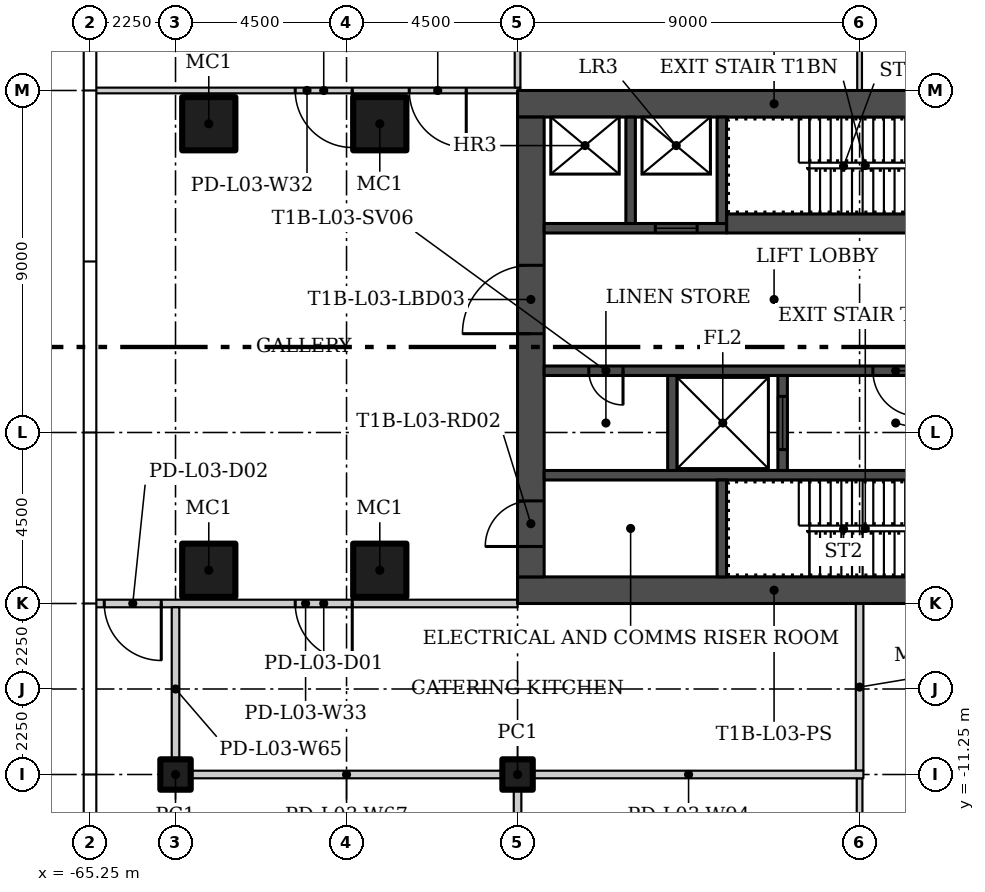
"""IFC4 building model, lengths in metres.
Left out: names, types, materials, properties, quantities, classifications, styles, units other than length and angle.
Written with IfcOpenShell. Run it as: python <this file> out.ifc"""

import sys

from ifc_helpers import new_model, si_unit, direction, frame, frame_2d, origin, origin_2d, place, context, subcontext, project, spatial, rectangle, hollow_rectangle, extrude, element, fill, save


model = new_model("IFC4")
c1 = context("Model", 3, precision=1e-05, world=origin(), true_north=direction((0.0, 1.0)))
c2 = subcontext(c1, "Body", "Model", "MODEL_VIEW")
j1 = project(units=[si_unit("LENGTHUNIT", "METRE"), si_unit("PLANEANGLEUNIT", "RADIAN")], contexts=[c1])
p1 = place(None, origin())
s1 = spatial("IfcSite", under=j1, at=p1, CompositionType="ELEMENT")
p2 = place(p1, origin())
s2 = spatial("IfcBuilding", under=s1, at=p2, CompositionType="ELEMENT")
p3 = place(p2, frame((0.0, 0.0, 18.5)))
s3 = spatial("IfcBuildingStorey", under=s2, at=p3, CompositionType="ELEMENT", Elevation=18.5)
for number, where in (
    (1, (-57.625, -5.875, 0.0)),
    (2, (-62.125, -5.875, 0.0)),
    (3, (-57.625, 5.875, 0.0)),
    (4, (-62.125, 5.875, 0.0)),
):
    element("IfcColumn", number, at=place(p3, frame(where)), inside=s3, PredefinedType="COLUMN", context=c2, shape_type="SweptSolid", body=[
        extrude(hollow_rectangle(XDim=1.4, YDim=1.4, WallThickness=0.06, at=origin_2d()), origin(), (0.0, 0.0, 1.0), 4.6),
    ])
for number, where in (
    (5, (-63.0, -11.25, 0.0)),
    (6, (-54.0, -11.25, 0.0)),
):
    element("IfcColumn", number, at=place(p3, frame(where)), inside=s3, PredefinedType="COLUMN", context=c2, shape_type="SweptSolid", body=[
        extrude(hollow_rectangle(XDim=0.8, YDim=0.8, WallThickness=0.03, at=origin_2d()), origin(), (0.0, 0.0, 1.0), 4.6),
    ])
p4 = place(p3, frame((-53.925, 6.75, 0.0), z_axis=(0.0, 0.0, 1.0), x_axis=(-1.0, 0.0, 0.0)))
e7 = element("IfcWall", 7, at=p4, inside=s3, PredefinedType="PARTITIONING", context=c2, shape_type="SweptSolid", body=[
    extrude(rectangle(XDim=11.23, YDim=0.15, at=frame_2d((5.615, 0.0))), origin(), (0.0, 0.0, 1.0), 4.6),
])
p5 = place(p4, frame((1.425, 0.0, 0.0)))
e8 = element("IfcOpeningElement", 8, at=p5, cuts=e7, PredefinedType="OPENING", context=c2, shape_type="SweptSolid", body=[
    extrude(rectangle(XDim=1.5, YDim=2.4, at=frame_2d((0.75, 1.2))), frame((0.0, 0.085, 0.0), z_axis=(0.0, -1.0, 0.0), x_axis=(1.0, 0.0, 0.0)), (0.0, 0.0, 1.0), 0.17),
])
p6 = place(p4, frame((4.425, 0.0, 0.0)))
e9 = element("IfcOpeningElement", 9, at=p6, cuts=e7, PredefinedType="OPENING", context=c2, shape_type="SweptSolid", body=[
    extrude(rectangle(XDim=1.5, YDim=2.4, at=frame_2d((0.75, 1.2))), frame((0.0, 0.085, 0.0), z_axis=(0.0, -1.0, 0.0), x_axis=(1.0, 0.0, 0.0)), (0.0, 0.0, 1.0), 0.17),
])
p7 = place(p3, frame((-54.0, -6.75, 0.0), z_axis=(0.0, 0.0, 1.0), x_axis=(-1.0, 0.0, 0.0)))
e10 = element("IfcWall", 10, at=p7, inside=s3, PredefinedType="PARTITIONING", context=c2, shape_type="SweptSolid", body=[
    extrude(rectangle(XDim=11.155, YDim=0.2, at=frame_2d((5.578, 0.0))), origin(), (0.0, 0.0, 1.0), 4.6),
])
p8 = place(p7, frame((4.35, 0.0, 0.0)))
e11 = element("IfcOpeningElement", 11, at=p8, cuts=e10, PredefinedType="OPENING", context=c2, shape_type="SweptSolid", body=[
    extrude(rectangle(XDim=1.5, YDim=2.4, at=frame_2d((0.75, 1.2))), frame((0.0, 0.11, 0.0), z_axis=(0.0, -1.0, 0.0), x_axis=(1.0, 0.0, 0.0)), (0.0, 0.0, 1.0), 0.22),
])
p9 = place(p7, frame((9.375, 0.0, 0.0)))
e12 = element("IfcOpeningElement", 12, at=p9, cuts=e10, PredefinedType="OPENING", context=c2, shape_type="SweptSolid", body=[
    extrude(rectangle(XDim=1.5, YDim=2.4, at=frame_2d((0.75, 1.2))), frame((0.0, 0.11, 0.0), z_axis=(0.0, -1.0, 0.0), x_axis=(1.0, 0.0, 0.0)), (0.0, 0.0, 1.0), 0.22),
])
p10 = place(p3, frame((-45.0, -17.275, 0.0), z_axis=(0.0, 0.0, 1.0), x_axis=(0.0, 1.0, 0.0)))
e13 = element("IfcWall", 13, at=p10, inside=s3, PredefinedType="PARTITIONING", context=c2, shape_type="SweptSolid", body=[
    extrude(rectangle(XDim=5.925, YDim=0.15, at=frame_2d((2.962, 0.0))), origin(), (0.0, 0.0, 1.0), 4.6),
])
p11 = place(p3, frame((-54.0, 6.825, 0.0), z_axis=(0.0, 0.0, 1.0), x_axis=(0.0, 1.0, 0.0)))
e14 = element("IfcWall", 14, at=p11, inside=s3, PredefinedType="PARTITIONING", context=c2, shape_type="SweptSolid", body=[
    extrude(rectangle(XDim=8.85, YDim=0.15, at=frame_2d((4.425, 0.0))), origin(), (0.0, 0.0, 1.0), 4.6),
])
p12 = place(p3, frame((-63.0, -11.15, 0.0), z_axis=(0.0, 0.0, 1.0), x_axis=(0.0, 1.0, 0.0)))
e15 = element("IfcWall", 15, at=p12, inside=s3, PredefinedType="PARTITIONING", context=c2, shape_type="SweptSolid", body=[
    extrude(rectangle(XDim=4.3, YDim=0.2, at=frame_2d((2.15, 0.0))), origin(), (0.0, 0.0, 1.0), 4.6),
])
p13 = place(p3, frame((-53.9, -11.25, 0.0), z_axis=(0.0, 0.0, 1.0), x_axis=(-1.0, 0.0, 0.0)))
e16 = element("IfcWall", 16, at=p13, inside=s3, PredefinedType="PARTITIONING", context=c2, shape_type="SweptSolid", body=[
    extrude(rectangle(XDim=9.2, YDim=0.2, at=frame_2d((4.6, 0.0))), origin(), (0.0, 0.0, 1.0), 4.6),
])
p14 = place(p3, frame((-54.0, -20.15, 0.0), z_axis=(0.0, 0.0, 1.0), x_axis=(0.0, 1.0, 0.0)))
e17 = element("IfcWall", 17, at=p14, inside=s3, PredefinedType="PARTITIONING", context=c2, shape_type="SweptSolid", body=[
    extrude(rectangle(XDim=8.8, YDim=0.2, at=frame_2d((4.4, 0.0))), origin(), (0.0, 0.0, 1.0), 4.6),
])
p15 = place(p3, frame((-45.0, -11.15, 0.0), z_axis=(0.0, 0.0, 1.0), x_axis=(0.0, 1.0, 0.0)))
e18 = element("IfcWall", 18, at=p15, inside=s3, PredefinedType="PARTITIONING", context=c2, shape_type="SweptSolid", body=[
    extrude(rectangle(XDim=4.4, YDim=0.2, at=frame_2d((2.2, 0.0))), origin(), (0.0, 0.0, 1.0), 4.6),
])
p16 = place(p3, frame((-54.1, -11.25, 0.0)))
e19 = element("IfcWall", 19, at=p16, inside=s3, PredefinedType="PARTITIONING", context=c2, shape_type="SweptSolid", body=[
    extrude(rectangle(XDim=9.2, YDim=0.2, at=frame_2d((4.6, 0.0))), origin(), (0.0, 0.0, 1.0), 4.6),
])
p17 = place(p3, frame((-45.0, 6.75, 0.0), z_axis=(0.0, 0.0, 1.0), x_axis=(0.0, 1.0, 0.0)))
e20 = element("IfcWall", 20, at=p17, inside=s3, PredefinedType="PARTITIONING", context=c2, shape_type="SweptSolid", body=[
    extrude(rectangle(XDim=6.037, YDim=0.125, at=frame_2d((3.019, 0.0))), origin(), (0.0, 0.0, 1.0), 4.6),
])
for number, where, z_axis, x_axis in (
    (21, (-40.5, -6.4, 0.0), (0.0, 0.0, 1.0), (-1.0, 0.0, 0.0)),
    (22, (-40.5, 6.4, 0.0), (0.0, 0.0, 1.0), (-1.0, 0.0, 0.0)),
):
    element("IfcWall", number, at=place(p3, frame(where, z_axis=z_axis, x_axis=x_axis)), inside=s3, PredefinedType="SHEAR", context=c2, shape_type="SweptSolid", body=[
        extrude(rectangle(XDim=13.5, YDim=0.7, at=frame_2d((6.75, 0.0))), origin(), (0.0, 0.0, 1.0), 4.6),
    ])
p18 = place(p3, frame((-53.65, -6.05, 0.0), z_axis=(0.0, 0.0, 1.0), x_axis=(0.0, 1.0, 0.0)))
e23 = element("IfcWall", 23, at=p18, inside=s3, PredefinedType="SHEAR", context=c2, shape_type="SweptSolid", body=[
    extrude(rectangle(XDim=12.1, YDim=0.7, at=frame_2d((6.05, 0.0))), origin(), (0.0, 0.0, 1.0), 4.6),
])
p19 = place(p18, frame((0.8, 0.0, 0.0)))
e24 = element("IfcOpeningElement", 24, at=p19, cuts=e23, PredefinedType="OPENING", context=c2, shape_type="SweptSolid", body=[
    extrude(rectangle(XDim=1.2, YDim=2.1, at=frame_2d((0.6, 1.05))), frame((0.0, 0.36, 0.0), z_axis=(0.0, -1.0, 0.0), x_axis=(1.0, 0.0, 0.0)), (0.0, 0.0, 1.0), 0.72),
])
p20 = place(p18, frame((6.4, 0.0, 0.0)))
e25 = element("IfcOpeningElement", 25, at=p20, cuts=e23, PredefinedType="OPENING", context=c2, shape_type="SweptSolid", body=[
    extrude(rectangle(XDim=1.8, YDim=2.4, at=frame_2d((0.9, 1.2))), frame((0.0, 0.36, 0.0), z_axis=(0.0, -1.0, 0.0), x_axis=(1.0, 0.0, 0.0)), (0.0, 0.0, 1.0), 0.72),
])
p21 = place(p3, frame((-41.2, -3.375, 0.0), z_axis=(0.0, 0.0, 1.0), x_axis=(-1.0, 0.0, 0.0)))
e26 = element("IfcWall", 26, at=p21, inside=s3, PredefinedType="SHEAR", context=c2, shape_type="SweptSolid", body=[
    extrude(rectangle(XDim=12.1, YDim=0.25, at=frame_2d((6.05, 0.0))), origin(), (0.0, 0.0, 1.0), 4.6),
])
p22 = place(p21, frame((0.05, 0.0, 0.0)))
e27 = element("IfcOpeningElement", 27, at=p22, cuts=e26, PredefinedType="OPENING", context=c2, shape_type="SweptSolid", body=[
    extrude(rectangle(XDim=1.1, YDim=2.1, at=frame_2d((0.55, 1.05))), frame((0.0, 0.135, 0.0), z_axis=(0.0, -1.0, 0.0), x_axis=(1.0, 0.0, 0.0)), (0.0, 0.0, 1.0), 0.27),
])
p23 = place(p3, frame((-48.625, -6.05, 0.0), z_axis=(0.0, 0.0, 1.0), x_axis=(0.0, 1.0, 0.0)))
e28 = element("IfcWall", 28, at=p23, inside=s3, PredefinedType="SHEAR", context=c2, shape_type="SweptSolid", body=[
    extrude(rectangle(XDim=2.55, YDim=0.25, at=frame_2d((1.275, 0.0))), origin(), (0.0, 0.0, 1.0), 4.6),
])
p24 = place(p3, frame((-41.2, -0.625, 0.0), z_axis=(0.0, 0.0, 1.0), x_axis=(-1.0, 0.0, 0.0)))
e29 = element("IfcWall", 29, at=p24, inside=s3, PredefinedType="SHEAR", context=c2, shape_type="SweptSolid", body=[
    extrude(rectangle(XDim=12.1, YDim=0.25, at=frame_2d((6.05, 0.0))), origin(), (0.0, 0.0, 1.0), 4.6),
])
p25 = place(p24, frame((2.25, 0.0, 0.0)))
e30 = element("IfcOpeningElement", 30, at=p25, cuts=e29, PredefinedType="OPENING", context=c2, shape_type="SweptSolid", body=[
    extrude(rectangle(XDim=1.2, YDim=2.1, at=frame_2d((0.6, 1.05))), frame((0.0, 0.135, 0.0), z_axis=(0.0, -1.0, 0.0), x_axis=(1.0, 0.0, 0.0)), (0.0, 0.0, 1.0), 0.27),
])
p26 = place(p24, frame((10.025, 0.0, 0.0)))
e31 = element("IfcOpeningElement", 31, at=p26, cuts=e29, PredefinedType="OPENING", context=c2, shape_type="SweptSolid", body=[
    extrude(rectangle(XDim=0.9, YDim=2.1, at=frame_2d((0.45, 1.05))), frame((0.0, 0.135, 0.0), z_axis=(0.0, -1.0, 0.0), x_axis=(1.0, 0.0, 0.0)), (0.0, 0.0, 1.0), 0.27),
])
p27 = place(p3, frame((-47.025, -3.25, 0.0), z_axis=(0.0, 0.0, 1.0), x_axis=(0.0, 1.0, 0.0)))
e32 = element("IfcWall", 32, at=p27, inside=s3, PredefinedType="SHEAR", context=c2, shape_type="SweptSolid", body=[
    extrude(rectangle(XDim=2.5, YDim=0.25, at=frame_2d((1.25, 0.0))), origin(), (0.0, 0.0, 1.0), 4.6),
])
p28 = place(p27, frame((0.55, 0.0, 0.0)))
e33 = element("IfcOpeningElement", 33, at=p28, cuts=e32, PredefinedType="OPENING", context=c2, shape_type="SweptSolid", body=[
    extrude(rectangle(XDim=1.4, YDim=2.4, at=frame_2d((0.7, 1.2))), frame((0.0, 0.135, 0.0), z_axis=(0.0, -1.0, 0.0), x_axis=(1.0, 0.0, 0.0)), (0.0, 0.0, 1.0), 0.27),
])
p29 = place(p3, frame((-49.925, -3.25, 0.0), z_axis=(0.0, 0.0, 1.0), x_axis=(0.0, 1.0, 0.0)))
e34 = element("IfcWall", 34, at=p29, inside=s3, PredefinedType="SHEAR", context=c2, shape_type="SweptSolid", body=[
    extrude(rectangle(XDim=2.5, YDim=0.25, at=frame_2d((1.25, 0.0))), origin(), (0.0, 0.0, 1.0), 4.6),
])
p30 = place(p3, frame((-48.5, 3.25, 0.0)))
e35 = element("IfcWall", 35, at=p30, inside=s3, PredefinedType="SHEAR", context=c2, shape_type="SweptSolid", body=[
    extrude(rectangle(XDim=7.3, YDim=0.5, at=frame_2d((3.65, 0.0))), origin(), (0.0, 0.0, 1.0), 4.6),
])
p31 = place(p30, frame((6.15, 0.0, 0.0)))
e36 = element("IfcOpeningElement", 36, at=p31, cuts=e35, PredefinedType="OPENING", context=c2, shape_type="SweptSolid", body=[
    extrude(rectangle(XDim=1.1, YDim=2.1, at=frame_2d((0.55, 1.05))), frame((0.0, 0.26, 0.0), z_axis=(0.0, -1.0, 0.0), x_axis=(1.0, 0.0, 0.0)), (0.0, 0.0, 1.0), 0.52),
])
p32 = place(p3, frame((-48.5, 3.125, 0.0), z_axis=(0.0, 0.0, 1.0), x_axis=(-1.0, 0.0, 0.0)))
e37 = element("IfcWall", 37, at=p32, inside=s3, PredefinedType="SHEAR", context=c2, shape_type="SweptSolid", body=[
    extrude(rectangle(XDim=4.8, YDim=0.25, at=frame_2d((2.4, 0.0))), origin(), (0.0, 0.0, 1.0), 4.6),
])
p33 = place(p32, frame((0.775, 0.0, 0.0)))
e38 = element("IfcOpeningElement", 38, at=p33, cuts=e37, PredefinedType="OPENING", context=c2, shape_type="SweptSolid", body=[
    extrude(rectangle(XDim=1.1, YDim=2.1, at=frame_2d((0.55, 1.05))), frame((0.0, 0.135, 0.0), z_axis=(0.0, -1.0, 0.0), x_axis=(1.0, 0.0, 0.0)), (0.0, 0.0, 1.0), 0.27),
])
for number, where, z_axis, x_axis in (
    (39, (-48.625, 3.25, 0.0), (0.0, 0.0, 1.0), (0.0, 1.0, 0.0)),
    (40, (-51.025, 3.25, 0.0), (0.0, 0.0, 1.0), (0.0, 1.0, 0.0)),
):
    element("IfcWall", number, at=place(p3, frame(where, z_axis=z_axis, x_axis=x_axis)), inside=s3, PredefinedType="SHEAR", context=c2, shape_type="SweptSolid", body=[
        extrude(rectangle(XDim=2.8, YDim=0.25, at=frame_2d((1.4, 0.0))), origin(), (0.0, 0.0, 1.0), 4.6),
    ])
p34 = place(p8, origin())
e41 = element("IfcDoor", 41, at=p34, inside=s3, OperationType="DOUBLE_DOOR_SINGLE_SWING", PredefinedType="DOOR", context=c2, shape_type="SweptSolid", body=[
    extrude(rectangle(XDim=1.5, YDim=2.4, at=frame_2d((0.75, 1.2))), frame((0.0, 0.025, 0.0), z_axis=(0.0, -1.0, 0.0), x_axis=(1.0, 0.0, 0.0)), (0.0, 0.0, 1.0), 0.05),
])
fill(e11, e41)
p35 = place(p9, origin())
e42 = element("IfcDoor", 42, at=p35, inside=s3, OperationType="DOUBLE_DOOR_SINGLE_SWING", PredefinedType="DOOR", context=c2, shape_type="SweptSolid", body=[
    extrude(rectangle(XDim=1.5, YDim=2.4, at=frame_2d((0.75, 1.2))), frame((0.0, 0.025, 0.0), z_axis=(0.0, -1.0, 0.0), x_axis=(1.0, 0.0, 0.0)), (0.0, 0.0, 1.0), 0.05),
])
fill(e12, e42)
p36 = place(p5, origin())
e43 = element("IfcDoor", 43, at=p36, inside=s3, OperationType="DOUBLE_DOOR_SINGLE_SWING", PredefinedType="DOOR", context=c2, shape_type="SweptSolid", body=[
    extrude(rectangle(XDim=1.5, YDim=2.4, at=frame_2d((0.75, 1.2))), frame((0.0, 0.025, 0.0), z_axis=(0.0, -1.0, 0.0), x_axis=(1.0, 0.0, 0.0)), (0.0, 0.0, 1.0), 0.05),
])
fill(e8, e43)
p37 = place(p6, origin())
e44 = element("IfcDoor", 44, at=p37, inside=s3, OperationType="DOUBLE_DOOR_SINGLE_SWING", PredefinedType="DOOR", context=c2, shape_type="SweptSolid", body=[
    extrude(rectangle(XDim=1.5, YDim=2.4, at=frame_2d((0.75, 1.2))), frame((0.0, 0.025, 0.0), z_axis=(0.0, -1.0, 0.0), x_axis=(1.0, 0.0, 0.0)), (0.0, 0.0, 1.0), 0.05),
])
fill(e9, e44)
p38 = place(p19, origin())
e45 = element("IfcDoor", 45, at=p38, inside=s3, OperationType="SINGLE_SWING_LEFT", PredefinedType="DOOR", context=c2, shape_type="SweptSolid", body=[
    extrude(rectangle(XDim=1.2, YDim=2.1, at=frame_2d((0.6, 1.05))), frame((0.0, 0.025, 0.0), z_axis=(0.0, -1.0, 0.0), x_axis=(1.0, 0.0, 0.0)), (0.0, 0.0, 1.0), 0.05),
])
fill(e24, e45)
p39 = place(p20, origin())
e46 = element("IfcDoor", 46, at=p39, inside=s3, OperationType="DOUBLE_DOOR_SINGLE_SWING", PredefinedType="DOOR", context=c2, shape_type="SweptSolid", body=[
    extrude(rectangle(XDim=1.8, YDim=2.4, at=frame_2d((0.9, 1.2))), frame((0.0, 0.025, 0.0), z_axis=(0.0, -1.0, 0.0), x_axis=(1.0, 0.0, 0.0)), (0.0, 0.0, 1.0), 0.05),
])
fill(e25, e46)
p40 = place(p25, origin())
e47 = element("IfcDoor", 47, at=p40, inside=s3, OperationType="SINGLE_SWING_LEFT", PredefinedType="DOOR", context=c2, shape_type="SweptSolid", body=[
    extrude(rectangle(XDim=1.2, YDim=2.1, at=frame_2d((0.6, 1.05))), frame((0.0, 0.025, 0.0), z_axis=(0.0, -1.0, 0.0), x_axis=(1.0, 0.0, 0.0)), (0.0, 0.0, 1.0), 0.05),
])
fill(e30, e47)
p41 = place(p26, origin())
e48 = element("IfcDoor", 48, at=p41, inside=s3, OperationType="SINGLE_SWING_RIGHT", PredefinedType="DOOR", context=c2, shape_type="SweptSolid", body=[
    extrude(rectangle(XDim=0.9, YDim=2.1, at=frame_2d((0.45, 1.05))), frame((0.0, 0.025, 0.0), z_axis=(0.0, -1.0, 0.0), x_axis=(1.0, 0.0, 0.0)), (0.0, 0.0, 1.0), 0.05),
])
fill(e31, e48)
p42 = place(p28, origin())
e49 = element("IfcDoor", 49, at=p42, inside=s3, OperationType="SLIDING_TO_LEFT", PredefinedType="DOOR", context=c2, shape_type="SweptSolid", body=[
    extrude(rectangle(XDim=1.4, YDim=2.4, at=frame_2d((0.7, 1.2))), frame((0.0, 0.025, 0.0), z_axis=(0.0, -1.0, 0.0), x_axis=(1.0, 0.0, 0.0)), (0.0, 0.0, 1.0), 0.05),
])
fill(e33, e49)
p43 = place(p33, origin())
e50 = element("IfcDoor", 50, at=p43, inside=s3, OperationType="SLIDING_TO_LEFT", PredefinedType="DOOR", context=c2, shape_type="SweptSolid", body=[
    extrude(rectangle(XDim=1.1, YDim=2.1, at=frame_2d((0.55, 1.05))), frame((0.0, 0.025, 0.0), z_axis=(0.0, -1.0, 0.0), x_axis=(1.0, 0.0, 0.0)), (0.0, 0.0, 1.0), 0.05),
])
fill(e38, e50)
save(model, sys.argv[1])
